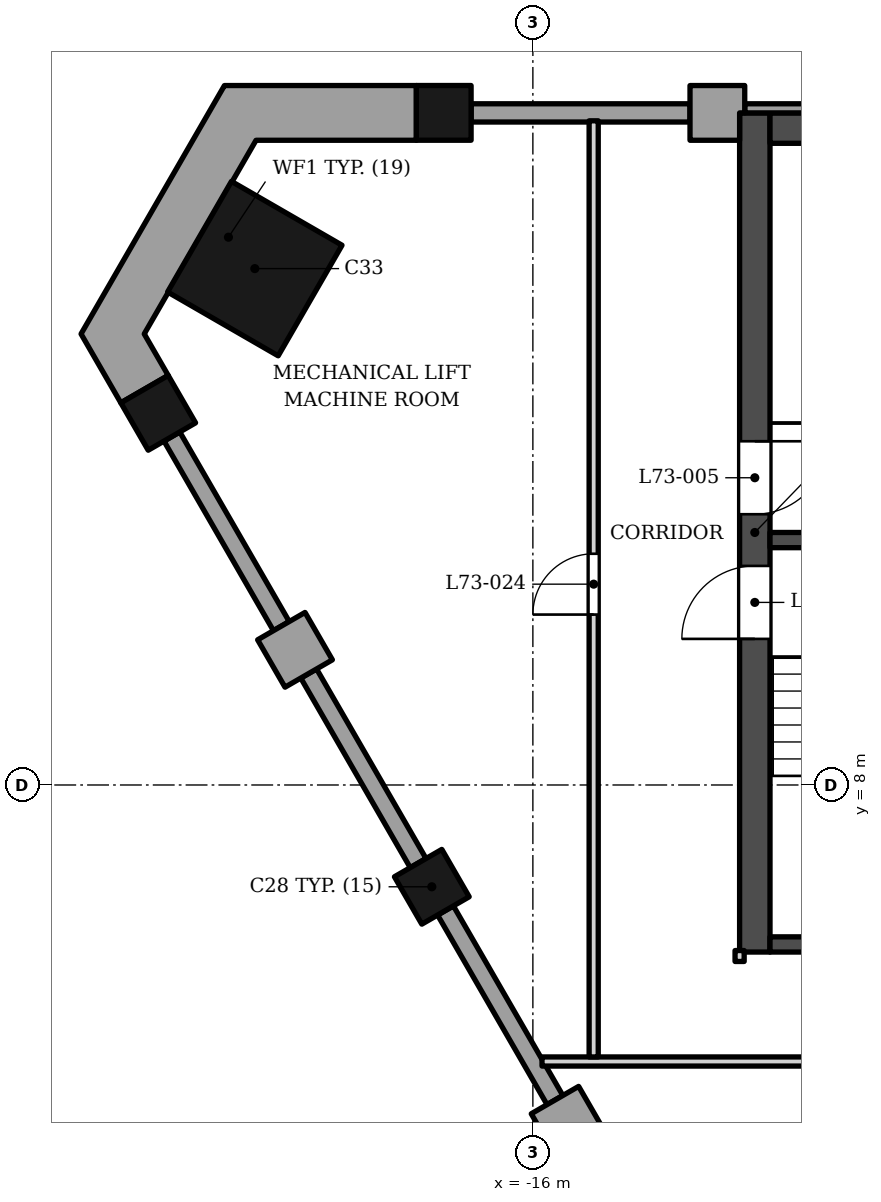
"""IFC4 building model, lengths in metres.
Left out: names, types, materials, properties, quantities, classifications, styles, units other than length and angle.
Written with IfcOpenShell. Run it as: python <this file> out.ifc"""

import sys

from ifc_helpers import new_model, si_unit, direction, frame, frame_2d, origin, origin_2d, place, context, subcontext, project, spatial, polyline, rectangle, outline, extrude, element, fill, save


model = new_model("IFC4")
c1 = context("Model", 3, precision=1e-05, world=origin(), true_north=direction((0.0, 1.0)))
c2 = subcontext(c1, "Body", "Model", "MODEL_VIEW")
j1 = project(units=[si_unit("LENGTHUNIT", "METRE"), si_unit("PLANEANGLEUNIT", "RADIAN")], contexts=[c1])
p1 = place(None, origin())
s1 = spatial("IfcSite", under=j1, at=p1, CompositionType="ELEMENT")
p2 = place(p1, origin())
s2 = spatial("IfcBuilding", under=s1, at=p2, CompositionType="ELEMENT")
p3 = place(p2, frame((0.0, 0.0, 310.5)))
s3 = spatial("IfcBuildingStorey", under=s2, at=p3, CompositionType="ELEMENT", Elevation=310.5)
p4 = place(p3, frame((-12.1, 18.802, 0.0), z_axis=(0.0, 0.0, 1.0), x_axis=(1.0, 0.0, 0.0)))
e1 = element("IfcWall", 1, at=p4, inside=s3, PredefinedType="SHEAR", context=c2, shape_type="SweptSolid", body=[
    extrude(rectangle(XDim=24.2, YDim=0.5, at=frame_2d((12.1, 0.0))), origin(), (0.0, 0.0, 1.0), 5.0),
])
p5 = place(p3, frame((-12.35, 5.253, 0.0), z_axis=(0.0, 0.0, 1.0), x_axis=(0.0, 1.0, 0.0)))
e2 = element("IfcWall", 2, at=p5, inside=s3, PredefinedType="SHEAR", context=c2, shape_type="SweptSolid", body=[
    extrude(rectangle(XDim=13.8, YDim=0.5, at=frame_2d((6.9, 0.0))), origin(), (0.0, 0.0, 1.0), 5.0),
])
p6 = place(p5, frame((7.2, 0.0, 0.0)))
e3 = element("IfcOpeningElement", 3, at=p6, cuts=e2, PredefinedType="OPENING", context=c2, shape_type="SweptSolid", body=[
    extrude(rectangle(XDim=1.2, YDim=2.1, at=frame_2d((0.6, 1.05))), frame((0.0, 0.26, 0.0), z_axis=(0.0, -1.0, 0.0), x_axis=(1.0, 0.0, 0.0)), (0.0, 0.0, 1.0), 0.52),
])
p7 = place(p5, frame((5.15, 0.0, 0.0)))
e4 = element("IfcOpeningElement", 4, at=p7, cuts=e2, PredefinedType="OPENING", context=c2, shape_type="SweptSolid", body=[
    extrude(rectangle(XDim=1.2, YDim=2.1, at=frame_2d((0.6, 1.05))), frame((0.0, 0.26, 0.0), z_axis=(0.0, -1.0, 0.0), x_axis=(1.0, 0.0, 0.0)), (0.0, 0.0, 1.0), 0.52),
])
for number, where, z_axis, x_axis in (
    (5, (-12.1, 12.028, 0.0), (0.0, 0.0, 1.0), (1.0, 0.0, 0.0)),
    (6, (-12.1, 5.378, 0.0), (0.0, 0.0, 1.0), (1.0, 0.0, 0.0)),
):
    element("IfcWall", number, at=place(p3, frame(where, z_axis=z_axis, x_axis=x_axis)), inside=s3, PredefinedType="SHEAR", context=c2, shape_type="SweptSolid", body=[
        extrude(rectangle(XDim=3.75, YDim=0.25, at=frame_2d((1.875, 0.0))), origin(), (0.0, 0.0, 1.0), 5.0),
    ])
p8 = place(p3, frame((-20.573, 16.492, 0.0), z_axis=(0.0, 0.0, 1.0), x_axis=(0.866025395058, -0.500000015115, 0.0)))
e7 = element("IfcColumn", 7, at=p8, inside=s3, PredefinedType="COLUMN", context=c2, shape_type="SweptSolid", body=[
    extrude(rectangle(XDim=2.1, YDim=2.1, at=origin_2d()), origin(), (0.0, 0.0, 1.0), 5.0),
])
for number, where, z_axis, x_axis in (
    (8, (-22.162, 14.12, 0.0), (0.0, 0.0, 1.0), (0.5, -0.866, 0.0)),
    (9, (-17.662, 6.326, 0.0), (0.0, 0.0, 1.0), (0.5, -0.866, 0.0)),
    (10, (-17.466, 19.053, 0.0), (0.0, 0.0, 1.0), (-1.0, 0.0, 0.0)),
):
    element("IfcColumn", number, at=place(p3, frame(where, z_axis=z_axis, x_axis=x_axis)), inside=s3, PredefinedType="COLUMN", context=c2, shape_type="SweptSolid", body=[
        extrude(rectangle(XDim=0.9, YDim=0.9, at=origin_2d()), origin(), (0.0, 0.0, 1.0), 5.0),
    ])
for number, where, z_axis, x_axis in (
    (11, (-20.302, 9.998, 0.0), (0.0, 0.0, 1.0), (0.866, 0.5, 0.0)),
    (12, (-15.022, 2.654, 0.0), (0.0, 0.0, 1.0), (-0.866, -0.5, 0.0)),
):
    element("IfcWall", number, at=place(p3, frame(where, z_axis=z_axis, x_axis=x_axis)), inside=s3, PredefinedType="SOLIDWALL", context=c2, shape_type="SweptSolid", body=[
        extrude(rectangle(XDim=0.9, YDim=0.9, at=frame_2d((0.45, 0.0))), origin(), (0.0, 0.0, 1.0), 3.8),
    ])
p9 = place(p3, frame((-21.937, 13.73, 0.0), z_axis=(0.0, 0.0, 1.0), x_axis=(0.499931829785, -0.866064758299, 0.0)))
e13 = element("IfcWall", 13, at=p9, inside=s3, PredefinedType="ELEMENTEDWALL", context=c2, shape_type="SweptSolid", body=[
    extrude(rectangle(XDim=3.6, YDim=0.3, at=frame_2d((1.8, 0.0))), origin(), (0.0, 0.0, 1.0), 3.8),
])
for number, where, z_axis, x_axis in (
    (14, (-19.687, 9.833, 0.0), (0.0, 0.0, 1.0), (0.5, -0.866, 0.0)),
    (15, (-17.437, 5.936, 0.0), (0.0, 0.0, 1.0), (0.5, -0.866, 0.0)),
):
    element("IfcWall", number, at=place(p3, frame(where, z_axis=z_axis, x_axis=x_axis)), inside=s3, PredefinedType="ELEMENTEDWALL", context=c2, shape_type="SweptSolid", body=[
        extrude(rectangle(XDim=3.6, YDim=0.3, at=frame_2d((1.8, 0.0))), origin(), (0.0, 0.0, 1.0), 3.8),
    ])
p10 = place(p3, origin())
e16 = element("IfcWall", 16, at=p10, inside=s3, PredefinedType="SOLIDWALL", context=c2, shape_type="SweptSolid", body=[
    extrude(outline(polyline([(-13.416, 19.502), (-13.416, 18.603), (-12.6, 18.603), (-12.6, 19.052), (-12.516, 19.052), (-12.516, 19.502), (-13.416, 19.502)])), origin(), (0.0, 0.0, 1.0), 3.8),
])
p11 = place(p3, origin())
e17 = element("IfcWall", 17, at=p11, inside=s3, PredefinedType="ELEMENTEDWALL", context=c2, shape_type="SweptSolid", body=[
    extrude(outline(polyline([(-8.916, 19.203), (-12.516, 19.203), (-12.516, 19.052), (-8.916, 19.052), (-8.916, 19.203)])), origin(), (0.0, 0.0, 1.0), 3.8),
])
p12 = place(p3, frame((-13.416, 19.052, 0.0), z_axis=(0.0, 0.0, 1.0), x_axis=(-1.0, 0.0, 0.0)))
e18 = element("IfcWall", 18, at=p12, inside=s3, PredefinedType="ELEMENTEDWALL", context=c2, shape_type="SweptSolid", body=[
    extrude(rectangle(XDim=3.6, YDim=0.3, at=frame_2d((1.8, 0.0))), origin(), (0.0, 0.0, 1.0), 3.8),
])
p13 = place(p3, origin())
e19 = element("IfcWall", 19, at=p13, inside=s3, PredefinedType="SOLIDWALL", context=c2, shape_type="SweptSolid", body=[
    extrude(outline(polyline([(-17.916, 18.603), (-17.916, 19.502), (-21.073, 19.502), (-23.431, 15.418), (-22.777, 14.285), (-21.997, 14.735), (-22.392, 15.418), (-20.553, 18.603), (-17.916, 18.603)])), origin(), (0.0, 0.0, 1.0), 3.8),
])
p14 = place(p3, frame((-15.85, 3.453, 0.0), z_axis=(0.0, 0.0, 1.0), x_axis=(1.0, 0.0, 0.0)))
e20 = element("IfcWall", 20, at=p14, inside=s3, PredefinedType="PARTITIONING", context=c2, shape_type="SweptSolid", body=[
    extrude(rectangle(XDim=17.755, YDim=0.15, at=frame_2d((8.877, 0.0))), origin(), (0.0, 0.0, 1.0), 3.812),
])
p15 = place(p14, frame((10.05, 0.0, 0.0)))
e21 = element("IfcOpeningElement", 21, at=p15, cuts=e20, PredefinedType="OPENING", context=c2, shape_type="SweptSolid", body=[
    extrude(rectangle(XDim=1.0, YDim=2.1, at=frame_2d((0.5, 1.05))), frame((0.0, 0.085, 0.0), z_axis=(0.0, -1.0, 0.0), x_axis=(1.0, 0.0, 0.0)), (0.0, 0.0, 1.0), 0.17),
])
p16 = place(p3, frame((-15.0, 3.528, 0.0), z_axis=(0.0, 0.0, 1.0), x_axis=(0.0, 1.0, 0.0)))
e22 = element("IfcWall", 22, at=p16, inside=s3, PredefinedType="PARTITIONING", context=c2, shape_type="SweptSolid", body=[
    extrude(rectangle(XDim=15.395, YDim=0.15, at=frame_2d((7.698, 0.0))), origin(), (0.0, 0.0, 1.0), 4.02),
])
p17 = place(p16, frame((7.275, 0.0, 0.0)))
e23 = element("IfcOpeningElement", 23, at=p17, cuts=e22, PredefinedType="OPENING", context=c2, shape_type="SweptSolid", body=[
    extrude(rectangle(XDim=1.0, YDim=2.1, at=frame_2d((0.5, 1.05))), frame((0.0, 0.085, 0.0), z_axis=(0.0, -1.0, 0.0), x_axis=(1.0, 0.0, 0.0)), (0.0, 0.0, 1.0), 0.17),
])
p18 = place(p3, frame((-12.6, 5.098, 0.0), z_axis=(0.0, 0.0, 1.0), x_axis=(0.0, 1.0, 0.0)))
e24 = element("IfcWall", 24, at=p18, inside=s3, PredefinedType="PARTITIONING", context=c2, shape_type="SweptSolid", body=[
    extrude(rectangle(XDim=0.18, YDim=0.15, at=frame_2d((0.09, 0.0))), origin(), (0.0, 0.0, 1.0), 4.8),
])
p19 = place(p6, origin())
e25 = element("IfcDoor", 25, at=p19, inside=s3, OperationType="SINGLE_SWING_RIGHT", PredefinedType="DOOR", context=c2, shape_type="SweptSolid", body=[
    extrude(rectangle(XDim=1.2, YDim=2.1, at=frame_2d((0.6, 1.05))), frame((0.0, 0.025, 0.0), z_axis=(0.0, -1.0, 0.0), x_axis=(1.0, 0.0, 0.0)), (0.0, 0.0, 1.0), 0.05),
])
fill(e3, e25)
p20 = place(p7, origin())
e26 = element("IfcDoor", 26, at=p20, inside=s3, OperationType="SINGLE_SWING_LEFT", PredefinedType="DOOR", context=c2, shape_type="SweptSolid", body=[
    extrude(rectangle(XDim=1.2, YDim=2.1, at=frame_2d((0.6, 1.05))), frame((0.0, 0.025, 0.0), z_axis=(0.0, -1.0, 0.0), x_axis=(1.0, 0.0, 0.0)), (0.0, 0.0, 1.0), 0.05),
])
fill(e4, e26)
p21 = place(p17, origin())
e27 = element("IfcDoor", 27, at=p21, inside=s3, OperationType="SINGLE_SWING_LEFT", PredefinedType="DOOR", context=c2, shape_type="SweptSolid", body=[
    extrude(rectangle(XDim=1.0, YDim=2.1, at=frame_2d((0.5, 1.05))), frame((0.0, 0.025, 0.0), z_axis=(0.0, -1.0, 0.0), x_axis=(1.0, 0.0, 0.0)), (0.0, 0.0, 1.0), 0.05),
])
fill(e23, e27)
save(model, sys.argv[1])
